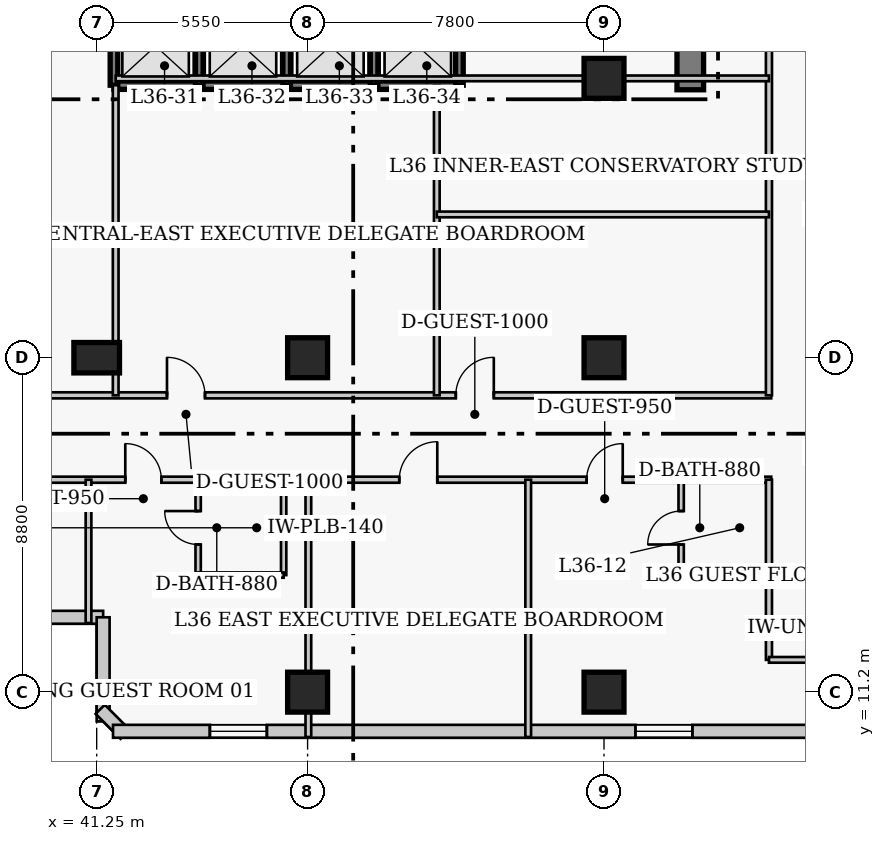
"""IFC4 building model, lengths in metres.
Left out: names, types, materials, properties, quantities, classifications, styles, units other than length and angle.
Written with IfcOpenShell. Run it as: python <this file> out.ifc"""

import sys

from ifc_helpers import new_model, si_unit, direction, frame, frame_2d, origin, origin_2d, place, context, subcontext, project, spatial, rectangle, extrude, element, fill, save


model = new_model("IFC4")
c1 = context("Model", 3, precision=1e-05, world=origin(), true_north=direction((0.0, 1.0)))
c2 = subcontext(c1, "Body", "Model", "MODEL_VIEW")
j1 = project(units=[si_unit("LENGTHUNIT", "METRE"), si_unit("PLANEANGLEUNIT", "RADIAN")], contexts=[c1])
p1 = place(None, origin())
s1 = spatial("IfcSite", under=j1, at=p1, CompositionType="ELEMENT")
p2 = place(p1, origin())
s2 = spatial("IfcBuilding", under=s1, at=p2, CompositionType="ELEMENT")
p3 = place(p2, frame((0.0, 0.0, 146.0)))
s3 = spatial("IfcBuildingStorey", under=s2, at=p3, CompositionType="ELEMENT", Elevation=146.0)
p4 = place(p3, frame((56.87, 27.05, 0.0), z_axis=(0.0, 0.0, 1.0), x_axis=(0.0, 1.0, 0.0)))
e1 = element("IfcWall", 1, at=p4, inside=s3, PredefinedType="SHEAR", context=c2, shape_type="SweptSolid", body=[
    extrude(rectangle(XDim=13.62, YDim=0.7, at=frame_2d((6.81, 0.0))), origin(), (0.0, 0.0, 1.0), 3.8),
])
p5 = place(p3, frame((41.25, 20.0, 0.0), z_axis=(0.0, 0.0, 1.0), x_axis=(1.0, 0.0, 0.0)))
e2 = element("IfcColumn", 2, at=p5, inside=s3, PredefinedType="COLUMN", context=c2, shape_type="SweptSolid", body=[
    extrude(rectangle(XDim=1.2, YDim=0.8, at=origin_2d()), origin(), (0.0, 0.0, 1.0), 3.8),
])
for number, where, z_axis, x_axis in (
    (3, (46.8, 11.2, 0.0), (0.0, 0.0, 1.0), (1.0, 0.0, 0.0)),
    (4, (46.8, 20.0, 0.0), (0.0, 0.0, 1.0), (1.0, 0.0, 0.0)),
    (5, (54.6, 11.2, 0.0), (0.0, 0.0, 1.0), (1.0, 0.0, 0.0)),
    (6, (54.6, 20.0, 0.0), (0.0, 0.0, 1.0), (1.0, 0.0, 0.0)),
    (7, (54.6, 27.35, 0.0), (0.0, 0.0, 1.0), (1.0, 0.0, 0.0)),
):
    element("IfcColumn", number, at=place(p3, frame(where, z_axis=z_axis, x_axis=x_axis)), inside=s3, PredefinedType="COLUMN", context=c2, shape_type="SweptSolid", body=[
        extrude(rectangle(XDim=1.05, YDim=1.05, at=origin_2d()), origin(), (0.0, 0.0, 1.0), 3.8),
    ])
p6 = place(p3, frame((36.58, 13.17, 0.0), z_axis=(0.0, 0.0, 1.0), x_axis=(1.0, 0.0, 0.0)))
e8 = element("IfcWall", 8, at=p6, inside=s3, PredefinedType="SOLIDWALL", context=c2, shape_type="SweptSolid", body=[
    extrude(rectangle(XDim=4.84, YDim=0.34, at=frame_2d((2.42, 0.0))), origin(), (0.0, 0.0, 1.0), 3.55),
])
p7 = place(p6, frame((1.67, 0.0, 0.85)))
e9 = element("IfcOpeningElement", 9, at=p7, cuts=e8, PredefinedType="OPENING", context=c2, shape_type="SweptSolid", body=[
    extrude(rectangle(XDim=1.5, YDim=1.75, at=frame_2d((0.75, 0.875))), frame((0.0, 0.18, 0.0), z_axis=(0.0, -1.0, 0.0), x_axis=(1.0, 0.0, 0.0)), (0.0, 0.0, 1.0), 0.36),
])
p8 = place(p3, frame((41.42, 13.17, 0.0), z_axis=(0.0, 0.0, 1.0), x_axis=(0.0, -1.0, 0.0)))
e10 = element("IfcWall", 10, at=p8, inside=s3, PredefinedType="SOLIDWALL", context=c2, shape_type="SweptSolid", body=[
    extrude(rectangle(XDim=2.74, YDim=0.34, at=frame_2d((1.37, 0.0))), origin(), (0.0, 0.0, 1.0), 3.55),
])
p9 = place(p3, frame((41.342, 10.749, 0.0), z_axis=(0.0, 0.0, 1.0), x_axis=(0.707106781187, -0.707106781187, 0.0)))
e11 = element("IfcWall", 11, at=p9, inside=s3, PredefinedType="SOLIDWALL", context=c2, shape_type="SweptSolid", body=[
    extrude(rectangle(XDim=0.929, YDim=0.34, at=frame_2d((0.464, 0.0))), origin(), (0.0, 0.0, 1.0), 3.55),
])
p10 = place(p3, frame((41.68, 10.17, 0.0), z_axis=(0.0, 0.0, 1.0), x_axis=(1.0, 0.0, 0.0)))
e12 = element("IfcWall", 12, at=p10, inside=s3, PredefinedType="SOLIDWALL", context=c2, shape_type="SweptSolid", body=[
    extrude(rectangle(XDim=26.69, YDim=0.34, at=frame_2d((13.345, 0.0))), origin(), (0.0, 0.0, 1.0), 3.55),
])
p11 = place(p10, frame((2.548, 0.0, 0.85)))
e13 = element("IfcOpeningElement", 13, at=p11, cuts=e12, PredefinedType="OPENING", context=c2, shape_type="SweptSolid", body=[
    extrude(rectangle(XDim=1.5, YDim=1.75, at=frame_2d((0.75, 0.875))), frame((0.0, 0.18, 0.0), z_axis=(0.0, -1.0, 0.0), x_axis=(1.0, 0.0, 0.0)), (0.0, 0.0, 1.0), 0.36),
])
p12 = place(p10, frame((13.745, 0.0, 0.85)))
e14 = element("IfcOpeningElement", 14, at=p12, cuts=e12, PredefinedType="OPENING", context=c2, shape_type="SweptSolid", body=[
    extrude(rectangle(XDim=1.5, YDim=1.75, at=frame_2d((0.75, 0.875))), frame((0.0, 0.18, 0.0), z_axis=(0.0, -1.0, 0.0), x_axis=(1.0, 0.0, 0.0)), (0.0, 0.0, 1.0), 0.36),
])
p13 = place(p10, frame((21.492, 0.0, 0.85)))
e15 = element("IfcOpeningElement", 15, at=p13, cuts=e12, PredefinedType="OPENING", context=c2, shape_type="SweptSolid", body=[
    extrude(rectangle(XDim=1.5, YDim=1.75, at=frame_2d((0.75, 0.875))), frame((0.0, 0.18, 0.0), z_axis=(0.0, -1.0, 0.0), x_axis=(1.0, 0.0, 0.0)), (0.0, 0.0, 1.0), 0.36),
])
p14 = place(p3, frame((41.705, 27.17, 0.0), z_axis=(0.0, 0.0, 1.0), x_axis=(1.0, 0.0, 0.0)))
e16 = element("IfcWall", 16, at=p14, inside=s3, PredefinedType="SHEAR", context=c2, shape_type="SweptSolid", body=[
    extrude(rectangle(XDim=2.245, YDim=0.22, at=frame_2d((1.123, 0.0))), origin(), (0.0, 0.0, 1.0), 3.8),
])
p15 = place(p3, frame((41.705, 27.17, 0.0), z_axis=(0.0, 0.0, 1.0), x_axis=(0.0, 1.0, 0.0)))
e17 = element("IfcWall", 17, at=p15, inside=s3, PredefinedType="SHEAR", context=c2, shape_type="SweptSolid", body=[
    extrude(rectangle(XDim=2.06, YDim=0.2, at=frame_2d((1.03, 0.0))), origin(), (0.0, 0.0, 1.0), 3.8),
])
p16 = place(p3, frame((43.95, 27.17, 0.0), z_axis=(0.0, 0.0, 1.0), x_axis=(1.0, 0.0, 0.0)))
e18 = element("IfcWall", 18, at=p16, inside=s3, PredefinedType="SHEAR", context=c2, shape_type="SweptSolid", body=[
    extrude(rectangle(XDim=2.3, YDim=0.22, at=frame_2d((1.15, 0.0))), origin(), (0.0, 0.0, 1.0), 3.8),
])
p17 = place(p3, frame((43.95, 27.17, 0.0), z_axis=(0.0, 0.0, 1.0), x_axis=(0.0, 1.0, 0.0)))
e19 = element("IfcWall", 19, at=p17, inside=s3, PredefinedType="SHEAR", context=c2, shape_type="SweptSolid", body=[
    extrude(rectangle(XDim=2.06, YDim=0.2, at=frame_2d((1.03, 0.0))), origin(), (0.0, 0.0, 1.0), 3.8),
])
p18 = place(p3, frame((46.25, 27.17, 0.0), z_axis=(0.0, 0.0, 1.0), x_axis=(1.0, 0.0, 0.0)))
e20 = element("IfcWall", 20, at=p18, inside=s3, PredefinedType="SHEAR", context=c2, shape_type="SweptSolid", body=[
    extrude(rectangle(XDim=2.3, YDim=0.22, at=frame_2d((1.15, 0.0))), origin(), (0.0, 0.0, 1.0), 3.8),
])
p19 = place(p3, frame((46.25, 27.17, 0.0), z_axis=(0.0, 0.0, 1.0), x_axis=(0.0, 1.0, 0.0)))
e21 = element("IfcWall", 21, at=p19, inside=s3, PredefinedType="SHEAR", context=c2, shape_type="SweptSolid", body=[
    extrude(rectangle(XDim=2.06, YDim=0.2, at=frame_2d((1.03, 0.0))), origin(), (0.0, 0.0, 1.0), 3.8),
])
p20 = place(p3, frame((48.55, 27.17, 0.0), z_axis=(0.0, 0.0, 1.0), x_axis=(1.0, 0.0, 0.0)))
e22 = element("IfcWall", 22, at=p20, inside=s3, PredefinedType="SHEAR", context=c2, shape_type="SweptSolid", body=[
    extrude(rectangle(XDim=2.245, YDim=0.22, at=frame_2d((1.123, 0.0))), origin(), (0.0, 0.0, 1.0), 3.8),
])
for number, where, z_axis, x_axis in (
    (23, (48.55, 27.17, 0.0), (0.0, 0.0, 1.0), (0.0, 1.0, 0.0)),
    (24, (50.795, 27.17, 0.0), (0.0, 0.0, 1.0), (0.0, 1.0, 0.0)),
):
    element("IfcWall", number, at=place(p3, frame(where, z_axis=z_axis, x_axis=x_axis)), inside=s3, PredefinedType="SHEAR", context=c2, shape_type="SweptSolid", body=[
        extrude(rectangle(XDim=2.06, YDim=0.2, at=frame_2d((1.03, 0.0))), origin(), (0.0, 0.0, 1.0), 3.8),
    ])
p21 = place(p3, frame((35.85, 19.01, 0.0), z_axis=(0.0, 0.0, 1.0), x_axis=(1.0, 0.0, 0.0)))
e25 = element("IfcWall", 25, at=p21, inside=s3, PredefinedType="PARTITIONING", context=c2, shape_type="SweptSolid", body=[
    extrude(rectangle(XDim=23.15, YDim=0.16, at=frame_2d((11.575, 0.0))), origin(), (0.0, 0.0, 1.0), 3.55),
])
p22 = place(p21, frame((7.25, 0.0, 0.0)))
e26 = element("IfcOpeningElement", 26, at=p22, cuts=e25, PredefinedType="OPENING", context=c2, shape_type="SweptSolid", body=[
    extrude(rectangle(XDim=1.0, YDim=2.15, at=frame_2d((0.5, 1.075))), frame((0.0, 0.09, 0.0), z_axis=(0.0, -1.0, 0.0), x_axis=(1.0, 0.0, 0.0)), (0.0, 0.0, 1.0), 0.18),
])
p23 = place(p21, frame((14.85, 0.0, 0.0)))
e27 = element("IfcOpeningElement", 27, at=p23, cuts=e25, PredefinedType="OPENING", context=c2, shape_type="SweptSolid", body=[
    extrude(rectangle(XDim=1.0, YDim=2.15, at=frame_2d((0.5, 1.075))), frame((0.0, 0.09, 0.0), z_axis=(0.0, -1.0, 0.0), x_axis=(1.0, 0.0, 0.0)), (0.0, 0.0, 1.0), 0.18),
])
p24 = place(p3, frame((35.8, 16.79, 0.0), z_axis=(0.0, 0.0, 1.0), x_axis=(1.0, 0.0, 0.0)))
e28 = element("IfcWall", 28, at=p24, inside=s3, PredefinedType="PARTITIONING", context=c2, shape_type="SweptSolid", body=[
    extrude(rectangle(XDim=23.2, YDim=0.16, at=frame_2d((11.6, 0.0))), origin(), (0.0, 0.0, 1.0), 3.55),
])
p25 = place(p24, frame((6.202, 0.0, 0.0)))
e29 = element("IfcOpeningElement", 29, at=p25, cuts=e28, PredefinedType="OPENING", context=c2, shape_type="SweptSolid", body=[
    extrude(rectangle(XDim=0.95, YDim=2.1, at=frame_2d((0.475, 1.05))), frame((0.0, 0.09, 0.0), z_axis=(0.0, -1.0, 0.0), x_axis=(1.0, 0.0, 0.0)), (0.0, 0.0, 1.0), 0.18),
])
p26 = place(p24, frame((13.413, 0.0, 0.0)))
e30 = element("IfcOpeningElement", 30, at=p26, cuts=e28, PredefinedType="OPENING", context=c2, shape_type="SweptSolid", body=[
    extrude(rectangle(XDim=1.0, YDim=2.15, at=frame_2d((0.5, 1.075))), frame((0.0, 0.09, 0.0), z_axis=(0.0, -1.0, 0.0), x_axis=(1.0, 0.0, 0.0)), (0.0, 0.0, 1.0), 0.18),
])
p27 = place(p24, frame((18.343, 0.0, 0.0)))
e31 = element("IfcOpeningElement", 31, at=p27, cuts=e28, PredefinedType="OPENING", context=c2, shape_type="SweptSolid", body=[
    extrude(rectangle(XDim=0.95, YDim=2.1, at=frame_2d((0.475, 1.05))), frame((0.0, 0.09, 0.0), z_axis=(0.0, -1.0, 0.0), x_axis=(1.0, 0.0, 0.0)), (0.0, 0.0, 1.0), 0.18),
])
p28 = place(p3, frame((58.94, 19.01, 0.0), z_axis=(0.0, 0.0, 1.0), x_axis=(0.0, 1.0, 0.0)))
e32 = element("IfcWall", 32, at=p28, inside=s3, PredefinedType="PARTITIONING", context=c2, shape_type="SweptSolid", body=[
    extrude(rectangle(XDim=21.64, YDim=0.16, at=frame_2d((10.82, 0.0))), origin(), (0.0, 0.0, 1.0), 3.55),
])
p29 = place(p3, frame((58.94, 12.05, 0.0), z_axis=(0.0, 0.0, 1.0), x_axis=(0.0, 1.0, 0.0)))
e33 = element("IfcWall", 33, at=p29, inside=s3, PredefinedType="PARTITIONING", context=c2, shape_type="SweptSolid", body=[
    extrude(rectangle(XDim=4.74, YDim=0.16, at=frame_2d((2.37, 0.0))), origin(), (0.0, 0.0, 1.0), 3.55),
])
p30 = place(p3, frame((58.94, 12.05, 0.0), z_axis=(0.0, 0.0, 1.0), x_axis=(1.0, 0.0, 0.0)))
e34 = element("IfcWall", 34, at=p30, inside=s3, PredefinedType="PARTITIONING", context=c2, shape_type="SweptSolid", body=[
    extrude(rectangle(XDim=2.22, YDim=0.15, at=frame_2d((1.11, 0.0))), origin(), (0.0, 0.0, 1.0), 3.55),
])
p31 = place(p3, frame((41.75, 19.01, 0.0), z_axis=(0.0, 0.0, 1.0), x_axis=(0.0, 1.0, 0.0)))
e35 = element("IfcWall", 35, at=p31, inside=s3, PredefinedType="PARTITIONING", context=c2, shape_type="SweptSolid", body=[
    extrude(rectangle(XDim=8.16, YDim=0.15, at=frame_2d((4.08, 0.0))), origin(), (0.0, 0.0, 1.0), 3.55),
])
p32 = place(p3, frame((50.2, 19.01, 0.0), z_axis=(0.0, 0.0, 1.0), x_axis=(0.0, 1.0, 0.0)))
e36 = element("IfcWall", 36, at=p32, inside=s3, PredefinedType="PARTITIONING", context=c2, shape_type="SweptSolid", body=[
    extrude(rectangle(XDim=8.14, YDim=0.15, at=frame_2d((4.07, 0.0))), origin(), (0.0, 0.0, 1.0), 3.55),
])
p33 = place(p3, frame((41.75, 27.35, 0.0), z_axis=(0.0, 0.0, 1.0), x_axis=(1.0, 0.0, 0.0)))
e37 = element("IfcWall", 37, at=p33, inside=s3, PredefinedType="PARTITIONING", context=c2, shape_type="SweptSolid", body=[
    extrude(rectangle(XDim=17.19, YDim=0.15, at=frame_2d((8.595, 0.0))), origin(), (0.0, 0.0, 1.0), 3.55),
])
p34 = place(p3, frame((50.2, 23.77, 0.0), z_axis=(0.0, 0.0, 1.0), x_axis=(1.0, 0.0, 0.0)))
e38 = element("IfcWall", 38, at=p34, inside=s3, PredefinedType="PARTITIONING", context=c2, shape_type="SweptSolid", body=[
    extrude(rectangle(XDim=8.74, YDim=0.15, at=frame_2d((4.37, 0.0))), origin(), (0.0, 0.0, 1.0), 3.55),
])
p35 = place(p3, frame((41.035, 13.02, 0.0), z_axis=(0.0, 0.0, 1.0), x_axis=(0.0, 1.0, 0.0)))
e39 = element("IfcWall", 39, at=p35, inside=s3, PredefinedType="PARTITIONING", context=c2, shape_type="SweptSolid", body=[
    extrude(rectangle(XDim=3.77, YDim=0.15, at=frame_2d((1.885, 0.0))), origin(), (0.0, 0.0, 1.0), 3.55),
])
p36 = place(p3, frame((43.92, 14.28, 0.0), z_axis=(0.0, 0.0, 1.0), x_axis=(0.0, 1.0, 0.0)))
e40 = element("IfcWall", 40, at=p36, inside=s3, PredefinedType="PLUMBINGWALL", context=c2, shape_type="SweptSolid", body=[
    extrude(rectangle(XDim=2.49, YDim=0.14, at=frame_2d((1.245, 0.0))), origin(), (0.0, 0.0, 1.0), 3.55),
])
p37 = place(p36, frame((0.805, 0.0, 0.0)))
e41 = element("IfcOpeningElement", 41, at=p37, cuts=e40, PredefinedType="OPENING", context=c2, shape_type="SweptSolid", body=[
    extrude(rectangle(XDim=0.88, YDim=2.05, at=frame_2d((0.44, 1.025))), frame((0.0, 0.08, 0.0), z_axis=(0.0, -1.0, 0.0), x_axis=(1.0, 0.0, 0.0)), (0.0, 0.0, 1.0), 0.16),
])
p38 = place(p3, frame((46.17, 14.28, 0.0), z_axis=(0.0, 0.0, 1.0), x_axis=(0.0, 1.0, 0.0)))
e42 = element("IfcWall", 42, at=p38, inside=s3, PredefinedType="PLUMBINGWALL", context=c2, shape_type="SweptSolid", body=[
    extrude(rectangle(XDim=2.49, YDim=0.14, at=frame_2d((1.245, 0.0))), origin(), (0.0, 0.0, 1.0), 3.55),
])
p39 = place(p3, frame((43.92, 14.28, 0.0), z_axis=(0.0, 0.0, 1.0), x_axis=(1.0, 0.0, 0.0)))
e43 = element("IfcWall", 43, at=p39, inside=s3, PredefinedType="PLUMBINGWALL", context=c2, shape_type="SweptSolid", body=[
    extrude(rectangle(XDim=2.25, YDim=0.14, at=frame_2d((1.125, 0.0))), origin(), (0.0, 0.0, 1.0), 3.55),
])
p40 = place(p3, frame((46.82, 10.02, 0.0), z_axis=(0.0, 0.0, 1.0), x_axis=(0.0, 1.0, 0.0)))
e44 = element("IfcWall", 44, at=p40, inside=s3, PredefinedType="PARTITIONING", context=c2, shape_type="SweptSolid", body=[
    extrude(rectangle(XDim=6.77, YDim=0.15, at=frame_2d((3.385, 0.0))), origin(), (0.0, 0.0, 1.0), 2.9),
])
p41 = place(p3, frame((52.605, 10.02, 0.0), z_axis=(0.0, 0.0, 1.0), x_axis=(0.0, 1.0, 0.0)))
e45 = element("IfcWall", 45, at=p41, inside=s3, PredefinedType="PARTITIONING", context=c2, shape_type="SweptSolid", body=[
    extrude(rectangle(XDim=6.77, YDim=0.15, at=frame_2d((3.385, 0.0))), origin(), (0.0, 0.0, 1.0), 3.55),
])
p42 = place(p3, frame((56.63, 14.28, 0.0), z_axis=(0.0, 0.0, 1.0), x_axis=(0.0, 1.0, 0.0)))
e46 = element("IfcWall", 46, at=p42, inside=s3, PredefinedType="PLUMBINGWALL", context=c2, shape_type="SweptSolid", body=[
    extrude(rectangle(XDim=2.49, YDim=0.14, at=frame_2d((1.245, 0.0))), origin(), (0.0, 0.0, 1.0), 3.55),
])
p43 = place(p42, frame((0.805, 0.0, 0.0)))
e47 = element("IfcOpeningElement", 47, at=p43, cuts=e46, PredefinedType="OPENING", context=c2, shape_type="SweptSolid", body=[
    extrude(rectangle(XDim=0.88, YDim=2.05, at=frame_2d((0.44, 1.025))), frame((0.0, 0.08, 0.0), z_axis=(0.0, -1.0, 0.0), x_axis=(1.0, 0.0, 0.0)), (0.0, 0.0, 1.0), 0.16),
])
p44 = place(p3, frame((56.63, 14.28, 0.0), z_axis=(0.0, 0.0, 1.0), x_axis=(1.0, 0.0, 0.0)))
e48 = element("IfcWall", 48, at=p44, inside=s3, PredefinedType="PLUMBINGWALL", context=c2, shape_type="SweptSolid", body=[
    extrude(rectangle(XDim=2.25, YDim=0.14, at=frame_2d((1.125, 0.0))), origin(), (0.0, 0.0, 1.0), 3.55),
])
p45 = place(p11, origin())
e49 = element("IfcWindow", 49, at=p45, inside=s3, PartitioningType="SINGLE_PANEL", PredefinedType="WINDOW", context=c2, shape_type="SweptSolid", body=[
    extrude(rectangle(XDim=1.5, YDim=1.75, at=frame_2d((0.75, 0.875))), frame((0.0, 0.03, 0.0), z_axis=(0.0, -1.0, 0.0), x_axis=(1.0, 0.0, 0.0)), (0.0, 0.0, 1.0), 0.06),
])
fill(e13, e49)
p46 = place(p12, origin())
e50 = element("IfcWindow", 50, at=p46, inside=s3, PartitioningType="SINGLE_PANEL", PredefinedType="WINDOW", context=c2, shape_type="SweptSolid", body=[
    extrude(rectangle(XDim=1.5, YDim=1.75, at=frame_2d((0.75, 0.875))), frame((0.0, 0.03, 0.0), z_axis=(0.0, -1.0, 0.0), x_axis=(1.0, 0.0, 0.0)), (0.0, 0.0, 1.0), 0.06),
])
fill(e14, e50)
p47 = place(p22, origin())
e51 = element("IfcDoor", 51, at=p47, inside=s3, OperationType="SINGLE_SWING_LEFT", PredefinedType="DOOR", context=c2, shape_type="SweptSolid", body=[
    extrude(rectangle(XDim=1.0, YDim=2.15, at=frame_2d((0.5, 1.075))), frame((0.0, 0.025, 0.0), z_axis=(0.0, -1.0, 0.0), x_axis=(1.0, 0.0, 0.0)), (0.0, 0.0, 1.0), 0.05),
])
fill(e26, e51)
p48 = place(p23, origin())
e52 = element("IfcDoor", 52, at=p48, inside=s3, OperationType="SINGLE_SWING_RIGHT", PredefinedType="DOOR", context=c2, shape_type="SweptSolid", body=[
    extrude(rectangle(XDim=1.0, YDim=2.15, at=frame_2d((0.5, 1.075))), frame((0.0, 0.025, 0.0), z_axis=(0.0, -1.0, 0.0), x_axis=(1.0, 0.0, 0.0)), (0.0, 0.0, 1.0), 0.05),
])
fill(e27, e52)
p49 = place(p37, origin())
e53 = element("IfcDoor", 53, at=p49, inside=s3, OperationType="SINGLE_SWING_RIGHT", PredefinedType="DOOR", context=c2, shape_type="SweptSolid", body=[
    extrude(rectangle(XDim=0.88, YDim=2.05, at=frame_2d((0.44, 1.025))), frame((0.0, 0.025, 0.0), z_axis=(0.0, -1.0, 0.0), x_axis=(1.0, 0.0, 0.0)), (0.0, 0.0, 1.0), 0.05),
])
fill(e41, e53)
p50 = place(p25, origin())
e54 = element("IfcDoor", 54, at=p50, inside=s3, OperationType="SINGLE_SWING_LEFT", PredefinedType="DOOR", context=c2, shape_type="SweptSolid", body=[
    extrude(rectangle(XDim=0.95, YDim=2.1, at=frame_2d((0.475, 1.05))), frame((0.0, 0.025, 0.0), z_axis=(0.0, -1.0, 0.0), x_axis=(1.0, 0.0, 0.0)), (0.0, 0.0, 1.0), 0.05),
])
fill(e29, e54)
p51 = place(p26, origin())
e55 = element("IfcDoor", 55, at=p51, inside=s3, OperationType="SINGLE_SWING_RIGHT", PredefinedType="DOOR", context=c2, shape_type="SweptSolid", body=[
    extrude(rectangle(XDim=1.0, YDim=2.15, at=frame_2d((0.5, 1.075))), frame((0.0, 0.025, 0.0), z_axis=(0.0, -1.0, 0.0), x_axis=(1.0, 0.0, 0.0)), (0.0, 0.0, 1.0), 0.05),
])
fill(e30, e55)
p52 = place(p43, origin())
e56 = element("IfcDoor", 56, at=p52, inside=s3, OperationType="SINGLE_SWING_LEFT", PredefinedType="DOOR", context=c2, shape_type="SweptSolid", body=[
    extrude(rectangle(XDim=0.88, YDim=2.05, at=frame_2d((0.44, 1.025))), frame((0.0, 0.025, 0.0), z_axis=(0.0, -1.0, 0.0), x_axis=(1.0, 0.0, 0.0)), (0.0, 0.0, 1.0), 0.05),
])
fill(e47, e56)
p53 = place(p27, origin())
e57 = element("IfcDoor", 57, at=p53, inside=s3, OperationType="SINGLE_SWING_RIGHT", PredefinedType="DOOR", context=c2, shape_type="SweptSolid", body=[
    extrude(rectangle(XDim=0.95, YDim=2.1, at=frame_2d((0.475, 1.05))), frame((0.0, 0.025, 0.0), z_axis=(0.0, -1.0, 0.0), x_axis=(1.0, 0.0, 0.0)), (0.0, 0.0, 1.0), 0.05),
])
fill(e31, e57)
save(model, sys.argv[1])
